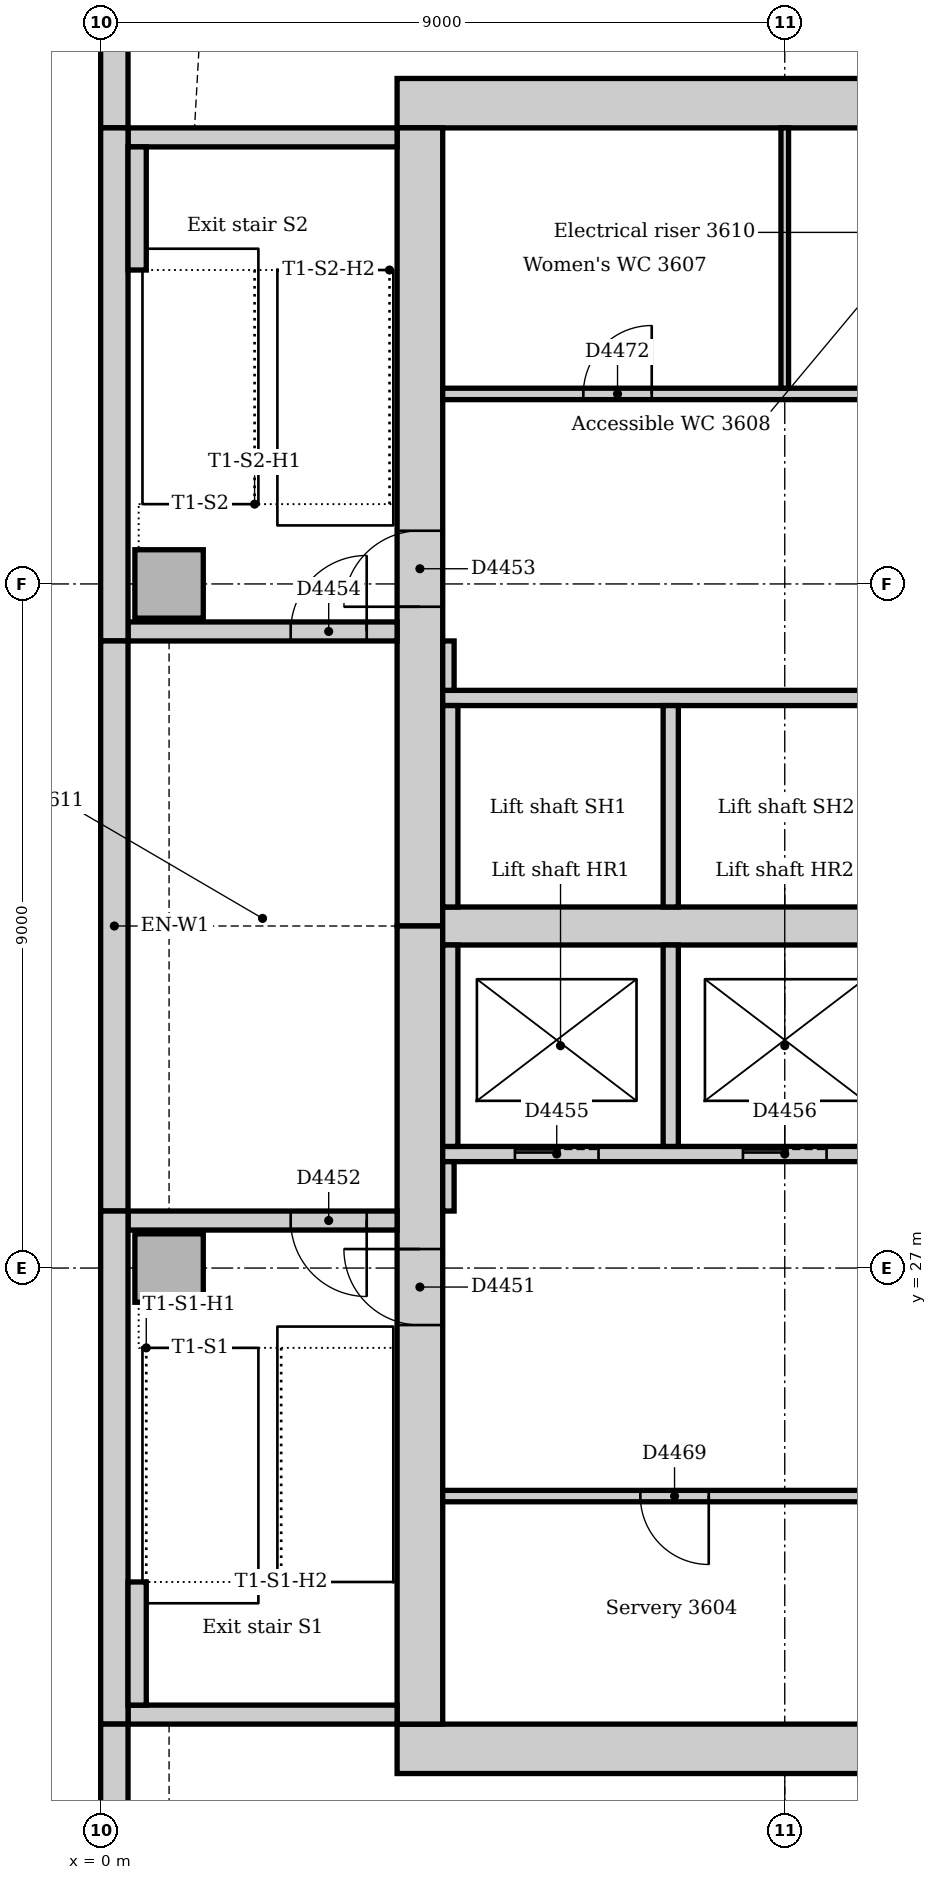
"""IFC4 building model, lengths in metres.
Left out: names, types, materials, properties, quantities, classifications, styles, units other than length and angle.
Written with IfcOpenShell. Run it as: python <this file> out.ifc"""

import sys

from ifc_helpers import new_model, si_unit, direction, frame, frame_2d, origin, origin_2d, place, context, subcontext, project, spatial, rectangle, extrude, element, fill, save


model = new_model("IFC4")
c1 = context("Model", 3, precision=1e-05, world=origin(), true_north=direction((0.0, 1.0)))
c2 = subcontext(c1, "Body", "Model", "MODEL_VIEW")
j1 = project(units=[si_unit("LENGTHUNIT", "METRE"), si_unit("PLANEANGLEUNIT", "RADIAN")], contexts=[c1])
p1 = place(None, origin())
s1 = spatial("IfcSite", under=j1, at=p1, CompositionType="ELEMENT")
p2 = place(p1, origin())
s2 = spatial("IfcBuilding", under=s1, at=p2, CompositionType="ELEMENT")
p3 = place(p2, frame((0.0, 0.0, 153.0)))
s3 = spatial("IfcBuildingStorey", under=s2, at=p3, CompositionType="ELEMENT", Elevation=153.0)
for number, where, z_axis, x_axis in (
    (1, (3.9, 20.675, 0.0), (0.0, 0.0, 1.0), (1.0, 0.0, 0.0)),
    (2, (23.15, 42.325, 0.0), (0.0, 0.0, 1.0), (-1.0, 0.0, 0.0)),
):
    element("IfcWall", number, at=place(p3, frame(where, z_axis=z_axis, x_axis=x_axis)), inside=s3, PredefinedType="SOLIDWALL", context=c2, shape_type="SweptSolid", body=[
        extrude(rectangle(XDim=19.25, YDim=0.65, at=frame_2d((9.625, 0.0))), origin(), (0.0, 0.0, 1.0), 4.0),
    ])
p4 = place(p3, frame((4.2, 42.0, 0.0), z_axis=(0.0, 0.0, 1.0), x_axis=(0.0, -1.0, 0.0)))
e3 = element("IfcWall", 3, at=p4, inside=s3, PredefinedType="SOLIDWALL", context=c2, shape_type="SweptSolid", body=[
    extrude(rectangle(XDim=10.5, YDim=0.6, at=frame_2d((5.25, 0.0))), origin(), (0.0, 0.0, 1.0), 4.0),
])
p5 = place(p4, frame((5.3, 0.0, 0.0)))
e4 = element("IfcOpeningElement", 4, at=p5, cuts=e3, PredefinedType="OPENING", context=c2, shape_type="SweptSolid", body=[
    extrude(rectangle(XDim=1.0, YDim=2.1, at=frame_2d((0.5, 1.05))), frame((0.0, 0.31, 0.0), z_axis=(0.0, -1.0, 0.0), x_axis=(1.0, 0.0, 0.0)), (0.0, 0.0, 1.0), 0.62),
])
p6 = place(p3, frame((4.2, 31.5, 0.0), z_axis=(0.0, 0.0, 1.0), x_axis=(0.0, -1.0, 0.0)))
e5 = element("IfcWall", 5, at=p6, inside=s3, PredefinedType="SOLIDWALL", context=c2, shape_type="SweptSolid", body=[
    extrude(rectangle(XDim=10.5, YDim=0.6, at=frame_2d((5.25, 0.0))), origin(), (0.0, 0.0, 1.0), 4.0),
])
p7 = place(p6, frame((4.25, 0.0, 0.0)))
e6 = element("IfcOpeningElement", 6, at=p7, cuts=e5, PredefinedType="OPENING", context=c2, shape_type="SweptSolid", body=[
    extrude(rectangle(XDim=1.0, YDim=2.1, at=frame_2d((0.5, 1.05))), frame((0.0, 0.31, 0.0), z_axis=(0.0, -1.0, 0.0), x_axis=(1.0, 0.0, 0.0)), (0.0, 0.0, 1.0), 0.62),
])
p8 = place(p3, frame((4.5, 31.5, 0.0), z_axis=(0.0, 0.0, 1.0), x_axis=(1.0, 0.0, 0.0)))
e7 = element("IfcWall", 7, at=p8, inside=s3, PredefinedType="SOLIDWALL", context=c2, shape_type="SweptSolid", body=[
    extrude(rectangle(XDim=18.0, YDim=0.5, at=frame_2d((9.0, 0.0))), origin(), (0.0, 0.0, 1.0), 4.0),
])
p9 = place(p3, frame((0.36, 21.125, 0.0), z_axis=(0.0, 0.0, 1.0), x_axis=(1.0, 0.0, 0.0)))
e8 = element("IfcWall", 8, at=p9, inside=s3, PredefinedType="SOLIDWALL", context=c2, shape_type="SweptSolid", body=[
    extrude(rectangle(XDim=3.54, YDim=0.25, at=frame_2d((1.77, 0.0))), origin(), (0.0, 0.0, 1.0), 4.0),
])
p10 = place(p3, frame((3.9, 27.625, 0.0), z_axis=(0.0, 0.0, 1.0), x_axis=(-1.0, 0.0, 0.0)))
e9 = element("IfcWall", 9, at=p10, inside=s3, PredefinedType="SOLIDWALL", context=c2, shape_type="SweptSolid", body=[
    extrude(rectangle(XDim=3.54, YDim=0.25, at=frame_2d((1.77, 0.0))), origin(), (0.0, 0.0, 1.0), 4.0),
])
p11 = place(p10, frame((0.4, 0.0, 0.0)))
e10 = element("IfcOpeningElement", 10, at=p11, cuts=e9, PredefinedType="OPENING", context=c2, shape_type="SweptSolid", body=[
    extrude(rectangle(XDim=1.0, YDim=2.1, at=frame_2d((0.5, 1.05))), frame((0.0, 0.135, 0.0), z_axis=(0.0, -1.0, 0.0), x_axis=(1.0, 0.0, 0.0)), (0.0, 0.0, 1.0), 0.27),
])
p12 = place(p3, frame((0.36, 35.375, 0.0), z_axis=(0.0, 0.0, 1.0), x_axis=(1.0, 0.0, 0.0)))
e11 = element("IfcWall", 11, at=p12, inside=s3, PredefinedType="SOLIDWALL", context=c2, shape_type="SweptSolid", body=[
    extrude(rectangle(XDim=3.54, YDim=0.25, at=frame_2d((1.77, 0.0))), origin(), (0.0, 0.0, 1.0), 4.0),
])
p13 = place(p12, frame((2.14, 0.0, 0.0)))
e12 = element("IfcOpeningElement", 12, at=p13, cuts=e11, PredefinedType="OPENING", context=c2, shape_type="SweptSolid", body=[
    extrude(rectangle(XDim=1.0, YDim=2.1, at=frame_2d((0.5, 1.05))), frame((0.0, 0.135, 0.0), z_axis=(0.0, -1.0, 0.0), x_axis=(1.0, 0.0, 0.0)), (0.0, 0.0, 1.0), 0.27),
])
p14 = place(p3, frame((3.9, 41.875, 0.0), z_axis=(0.0, 0.0, 1.0), x_axis=(-1.0, 0.0, 0.0)))
e13 = element("IfcWall", 13, at=p14, inside=s3, PredefinedType="SOLIDWALL", context=c2, shape_type="SweptSolid", body=[
    extrude(rectangle(XDim=3.54, YDim=0.25, at=frame_2d((1.77, 0.0))), origin(), (0.0, 0.0, 1.0), 4.0),
])
for number, where, z_axis, x_axis in (
    (14, (0.9, 27.0, 0.0), (0.0, 0.0, 1.0), (1.0, 0.0, 0.0)),
    (15, (0.9, 36.0, 0.0), (0.0, 0.0, 1.0), (1.0, 0.0, 0.0)),
):
    element("IfcColumn", number, at=place(p3, frame(where, z_axis=z_axis, x_axis=x_axis)), inside=s3, PredefinedType="COLUMN", context=c2, shape_type="SweptSolid", body=[
        extrude(rectangle(XDim=0.9, YDim=0.9, at=origin_2d()), origin(), (0.0, 0.0, 1.0), 4.0),
    ])
p15 = place(p3, frame((0.18, 49.757, 0.0), z_axis=(0.0, 0.0, 1.0), x_axis=(0.0, -1.0, 0.0)))
e16 = element("IfcWall", 16, at=p15, inside=s3, PredefinedType="STANDARD", context=c2, shape_type="SweptSolid", body=[
    extrude(rectangle(XDim=7.757, YDim=0.36, at=frame_2d((3.879, 0.0))), origin(), (0.0, 0.0, 1.0), 3.85),
])
p16 = place(p15, frame((3.107, 0.0, 0.9)))
e17 = element("IfcOpeningElement", 17, at=p16, cuts=e16, PredefinedType="OPENING", context=c2, shape_type="SweptSolid", body=[
    extrude(rectangle(XDim=3.3, YDim=1.6, at=frame_2d((1.65, 0.8))), frame((0.0, 0.19, 0.0), z_axis=(0.0, -1.0, 0.0), x_axis=(1.0, 0.0, 0.0)), (0.0, 0.0, 1.0), 0.38),
])
p17 = place(p3, frame((0.18, 42.0, 0.0), z_axis=(0.0, 0.0, 1.0), x_axis=(0.0, -1.0, 0.0)))
e18 = element("IfcWall", 18, at=p17, inside=s3, PredefinedType="STANDARD", context=c2, shape_type="SweptSolid", body=[
    extrude(rectangle(XDim=6.75, YDim=0.36, at=frame_2d((3.375, 0.0))), origin(), (0.0, 0.0, 1.0), 3.85),
])
p18 = place(p3, frame((0.18, 35.25, 0.0), z_axis=(0.0, 0.0, 1.0), x_axis=(0.0, -1.0, 0.0)))
e19 = element("IfcWall", 19, at=p18, inside=s3, PredefinedType="STANDARD", context=c2, shape_type="SweptSolid", body=[
    extrude(rectangle(XDim=7.5, YDim=0.36, at=frame_2d((3.75, 0.0))), origin(), (0.0, 0.0, 1.0), 3.85),
])
p19 = place(p3, frame((0.18, 27.75, 0.0), z_axis=(0.0, 0.0, 1.0), x_axis=(0.0, -1.0, 0.0)))
e20 = element("IfcWall", 20, at=p19, inside=s3, PredefinedType="STANDARD", context=c2, shape_type="SweptSolid", body=[
    extrude(rectangle(XDim=6.75, YDim=0.36, at=frame_2d((3.375, 0.0))), origin(), (0.0, 0.0, 1.0), 3.85),
])
p20 = place(p3, frame((0.18, 21.0, 0.0), z_axis=(0.0, 0.0, 1.0), x_axis=(0.0, -1.0, 0.0)))
e21 = element("IfcWall", 21, at=p20, inside=s3, PredefinedType="STANDARD", context=c2, shape_type="SweptSolid", body=[
    extrude(rectangle(XDim=7.757, YDim=0.36, at=frame_2d((3.879, 0.0))), origin(), (0.0, 0.0, 1.0), 3.85),
])
p21 = place(p20, frame((1.35, 0.0, 0.9)))
e22 = element("IfcOpeningElement", 22, at=p21, cuts=e21, PredefinedType="OPENING", context=c2, shape_type="SweptSolid", body=[
    extrude(rectangle(XDim=3.3, YDim=1.6, at=frame_2d((1.65, 0.8))), frame((0.0, 0.19, 0.0), z_axis=(0.0, -1.0, 0.0), x_axis=(1.0, 0.0, 0.0)), (0.0, 0.0, 1.0), 0.38),
])
for number, where, z_axis, x_axis in (
    (23, (0.48, 21.25, 0.0), (0.0, 0.0, 1.0), (0.0, 1.0, 0.0)),
    (24, (0.48, 40.13, 0.0), (0.0, 0.0, 1.0), (0.0, 1.0, 0.0)),
):
    element("IfcWall", number, at=place(p3, frame(where, z_axis=z_axis, x_axis=x_axis)), inside=s3, PredefinedType="STANDARD", context=c2, shape_type="SweptSolid", body=[
        extrude(rectangle(XDim=1.62, YDim=0.24, at=frame_2d((0.81, 0.0))), origin(), (0.0, 0.0, 1.0), 4.0),
    ])
p22 = place(p3, frame((4.5, 28.5, 0.0), z_axis=(0.0, 0.0, 1.0), x_axis=(1.0, 0.0, 0.0)))
e25 = element("IfcWall", 25, at=p22, inside=s3, PredefinedType="PARTITIONING", context=c2, shape_type="SweptSolid", body=[
    extrude(rectangle(XDim=18.0, YDim=0.2, at=frame_2d((9.0, 0.0))), origin(), (0.0, 0.0, 1.0), 3.85),
])
p23 = place(p22, frame((0.95, 0.0, 0.0)))
e26 = element("IfcOpeningElement", 26, at=p23, cuts=e25, PredefinedType="OPENING", context=c2, shape_type="SweptSolid", body=[
    extrude(rectangle(XDim=1.1, YDim=2.1, at=frame_2d((0.55, 1.05))), frame((0.0, 0.11, 0.0), z_axis=(0.0, -1.0, 0.0), x_axis=(1.0, 0.0, 0.0)), (0.0, 0.0, 1.0), 0.22),
])
p24 = place(p22, frame((3.95, 0.0, 0.0)))
e27 = element("IfcOpeningElement", 27, at=p24, cuts=e25, PredefinedType="OPENING", context=c2, shape_type="SweptSolid", body=[
    extrude(rectangle(XDim=1.1, YDim=2.1, at=frame_2d((0.55, 1.05))), frame((0.0, 0.11, 0.0), z_axis=(0.0, -1.0, 0.0), x_axis=(1.0, 0.0, 0.0)), (0.0, 0.0, 1.0), 0.22),
])
p25 = place(p22, frame((6.95, 0.0, 0.0)))
e28 = element("IfcOpeningElement", 28, at=p25, cuts=e25, PredefinedType="OPENING", context=c2, shape_type="SweptSolid", body=[
    extrude(rectangle(XDim=1.1, YDim=2.1, at=frame_2d((0.55, 1.05))), frame((0.0, 0.11, 0.0), z_axis=(0.0, -1.0, 0.0), x_axis=(1.0, 0.0, 0.0)), (0.0, 0.0, 1.0), 0.22),
])
p26 = place(p22, frame((9.95, 0.0, 0.0)))
e29 = element("IfcOpeningElement", 29, at=p26, cuts=e25, PredefinedType="OPENING", context=c2, shape_type="SweptSolid", body=[
    extrude(rectangle(XDim=1.1, YDim=2.1, at=frame_2d((0.55, 1.05))), frame((0.0, 0.11, 0.0), z_axis=(0.0, -1.0, 0.0), x_axis=(1.0, 0.0, 0.0)), (0.0, 0.0, 1.0), 0.22),
])
p27 = place(p22, frame((12.95, 0.0, 0.0)))
e30 = element("IfcOpeningElement", 30, at=p27, cuts=e25, PredefinedType="OPENING", context=c2, shape_type="SweptSolid", body=[
    extrude(rectangle(XDim=1.1, YDim=2.1, at=frame_2d((0.55, 1.05))), frame((0.0, 0.11, 0.0), z_axis=(0.0, -1.0, 0.0), x_axis=(1.0, 0.0, 0.0)), (0.0, 0.0, 1.0), 0.22),
])
p28 = place(p22, frame((15.95, 0.0, 0.0)))
e31 = element("IfcOpeningElement", 31, at=p28, cuts=e25, PredefinedType="OPENING", context=c2, shape_type="SweptSolid", body=[
    extrude(rectangle(XDim=1.1, YDim=2.1, at=frame_2d((0.55, 1.05))), frame((0.0, 0.11, 0.0), z_axis=(0.0, -1.0, 0.0), x_axis=(1.0, 0.0, 0.0)), (0.0, 0.0, 1.0), 0.22),
])
p29 = place(p3, frame((4.5, 34.5, 0.0), z_axis=(0.0, 0.0, 1.0), x_axis=(1.0, 0.0, 0.0)))
e32 = element("IfcWall", 32, at=p29, inside=s3, PredefinedType="PARTITIONING", context=c2, shape_type="SweptSolid", body=[
    extrude(rectangle(XDim=18.0, YDim=0.2, at=frame_2d((9.0, 0.0))), origin(), (0.0, 0.0, 1.0), 3.85),
])
p30 = place(p29, frame((12.95, 0.0, 0.0)))
e33 = element("IfcOpeningElement", 33, at=p30, cuts=e32, PredefinedType="OPENING", context=c2, shape_type="SweptSolid", body=[
    extrude(rectangle(XDim=1.1, YDim=2.1, at=frame_2d((0.55, 1.05))), frame((0.0, 0.11, 0.0), z_axis=(0.0, -1.0, 0.0), x_axis=(1.0, 0.0, 0.0)), (0.0, 0.0, 1.0), 0.22),
])
p31 = place(p29, frame((15.95, 0.0, 0.0)))
e34 = element("IfcOpeningElement", 34, at=p31, cuts=e32, PredefinedType="OPENING", context=c2, shape_type="SweptSolid", body=[
    extrude(rectangle(XDim=1.1, YDim=2.1, at=frame_2d((0.55, 1.05))), frame((0.0, 0.11, 0.0), z_axis=(0.0, -1.0, 0.0), x_axis=(1.0, 0.0, 0.0)), (0.0, 0.0, 1.0), 0.22),
])
for number, where, z_axis, x_axis in (
    (35, (4.6, 31.75, 0.0), (0.0, 0.0, 1.0), (0.0, 1.0, 0.0)),
    (36, (4.6, 28.6, 0.0), (0.0, 0.0, 1.0), (0.0, 1.0, 0.0)),
    (37, (7.5, 28.6, 0.0), (0.0, 0.0, 1.0), (0.0, 1.0, 0.0)),
    (38, (7.5, 31.75, 0.0), (0.0, 0.0, 1.0), (0.0, 1.0, 0.0)),
):
    element("IfcWall", number, at=place(p3, frame(where, z_axis=z_axis, x_axis=x_axis)), inside=s3, PredefinedType="PARTITIONING", context=c2, shape_type="SweptSolid", body=[
        extrude(rectangle(XDim=2.65, YDim=0.2, at=frame_2d((1.325, 0.0))), origin(), (0.0, 0.0, 1.0), 3.85),
    ])
p32 = place(p3, frame((4.5, 24.0, 0.0), z_axis=(0.0, 0.0, 1.0), x_axis=(1.0, 0.0, 0.0)))
e39 = element("IfcWall", 39, at=p32, inside=s3, PredefinedType="PARTITIONING", context=c2, shape_type="SweptSolid", body=[
    extrude(rectangle(XDim=18.0, YDim=0.15, at=frame_2d((9.0, 0.0))), origin(), (0.0, 0.0, 1.0), 3.85),
])
p33 = place(p32, frame((2.6, 0.0, 0.0)))
e40 = element("IfcOpeningElement", 40, at=p33, cuts=e39, PredefinedType="OPENING", context=c2, shape_type="SweptSolid", body=[
    extrude(rectangle(XDim=0.9, YDim=2.1, at=frame_2d((0.45, 1.05))), frame((0.0, 0.085, 0.0), z_axis=(0.0, -1.0, 0.0), x_axis=(1.0, 0.0, 0.0)), (0.0, 0.0, 1.0), 0.17),
])
p34 = place(p32, frame((8.55, 0.0, 0.0)))
e41 = element("IfcOpeningElement", 41, at=p34, cuts=e39, PredefinedType="OPENING", context=c2, shape_type="SweptSolid", body=[
    extrude(rectangle(XDim=0.9, YDim=2.1, at=frame_2d((0.45, 1.05))), frame((0.0, 0.085, 0.0), z_axis=(0.0, -1.0, 0.0), x_axis=(1.0, 0.0, 0.0)), (0.0, 0.0, 1.0), 0.17),
])
p35 = place(p32, frame((14.45, 0.0, 0.0)))
e42 = element("IfcOpeningElement", 42, at=p35, cuts=e39, PredefinedType="OPENING", context=c2, shape_type="SweptSolid", body=[
    extrude(rectangle(XDim=0.9, YDim=2.1, at=frame_2d((0.45, 1.05))), frame((0.0, 0.085, 0.0), z_axis=(0.0, -1.0, 0.0), x_axis=(1.0, 0.0, 0.0)), (0.0, 0.0, 1.0), 0.17),
])
p36 = place(p3, frame((4.5, 38.5, 0.0), z_axis=(0.0, 0.0, 1.0), x_axis=(1.0, 0.0, 0.0)))
e43 = element("IfcWall", 43, at=p36, inside=s3, PredefinedType="PARTITIONING", context=c2, shape_type="SweptSolid", body=[
    extrude(rectangle(XDim=11.9, YDim=0.15, at=frame_2d((5.95, 0.0))), origin(), (0.0, 0.0, 1.0), 3.85),
])
p37 = place(p36, frame((1.85, 0.0, 0.0)))
e44 = element("IfcOpeningElement", 44, at=p37, cuts=e43, PredefinedType="OPENING", context=c2, shape_type="SweptSolid", body=[
    extrude(rectangle(XDim=0.9, YDim=2.1, at=frame_2d((0.45, 1.05))), frame((0.0, 0.085, 0.0), z_axis=(0.0, -1.0, 0.0), x_axis=(1.0, 0.0, 0.0)), (0.0, 0.0, 1.0), 0.17),
])
p38 = place(p36, frame((5.55, 0.0, 0.0)))
e45 = element("IfcOpeningElement", 45, at=p38, cuts=e43, PredefinedType="OPENING", context=c2, shape_type="SweptSolid", body=[
    extrude(rectangle(XDim=0.9, YDim=2.1, at=frame_2d((0.45, 1.05))), frame((0.0, 0.085, 0.0), z_axis=(0.0, -1.0, 0.0), x_axis=(1.0, 0.0, 0.0)), (0.0, 0.0, 1.0), 0.17),
])
p39 = place(p36, frame((7.8, 0.0, 0.0)))
e46 = element("IfcOpeningElement", 46, at=p39, cuts=e43, PredefinedType="OPENING", context=c2, shape_type="SweptSolid", body=[
    extrude(rectangle(XDim=0.9, YDim=2.1, at=frame_2d((0.45, 1.05))), frame((0.0, 0.085, 0.0), z_axis=(0.0, -1.0, 0.0), x_axis=(1.0, 0.0, 0.0)), (0.0, 0.0, 1.0), 0.17),
])
p40 = place(p36, frame((9.95, 0.0, 0.0)))
e47 = element("IfcOpeningElement", 47, at=p40, cuts=e43, PredefinedType="OPENING", context=c2, shape_type="SweptSolid", body=[
    extrude(rectangle(XDim=0.8, YDim=2.1, at=frame_2d((0.4, 1.05))), frame((0.0, 0.085, 0.0), z_axis=(0.0, -1.0, 0.0), x_axis=(1.0, 0.0, 0.0)), (0.0, 0.0, 1.0), 0.17),
])
for number, where, z_axis, x_axis in (
    (48, (4.575, 27.75, 0.0), (0.0, 0.0, 1.0), (0.0, 1.0, 0.0)),
    (49, (4.575, 34.6, 0.0), (0.0, 0.0, 1.0), (0.0, 1.0, 0.0)),
):
    element("IfcWall", number, at=place(p3, frame(where, z_axis=z_axis, x_axis=x_axis)), inside=s3, PredefinedType="PARTITIONING", context=c2, shape_type="SweptSolid", body=[
        extrude(rectangle(XDim=0.65, YDim=0.15, at=frame_2d((0.325, 0.0))), origin(), (0.0, 0.0, 1.0), 3.85),
    ])
p41 = place(p3, frame((9.0, 38.575, 0.0), z_axis=(0.0, 0.0, 1.0), x_axis=(0.0, 1.0, 0.0)))
e50 = element("IfcWall", 50, at=p41, inside=s3, PredefinedType="PARTITIONING", context=c2, shape_type="SweptSolid", body=[
    extrude(rectangle(XDim=3.425, YDim=0.1, at=frame_2d((1.712, 0.0))), origin(), (0.0, 0.0, 1.0), 3.85),
])
p42 = place(p7, frame((1.0, 0.0, 0.0), z_axis=(0.0, 0.0, 1.0), x_axis=(-1.0, 0.0, 0.0)))
e51 = element("IfcDoor", 51, at=p42, inside=s3, OperationType="SINGLE_SWING_RIGHT", PredefinedType="DOOR", context=c2, shape_type="SweptSolid", body=[
    extrude(rectangle(XDim=1.0, YDim=2.1, at=frame_2d((0.5, 1.05))), frame((0.0, 0.025, 0.0), z_axis=(0.0, -1.0, 0.0), x_axis=(1.0, 0.0, 0.0)), (0.0, 0.0, 1.0), 0.05),
])
fill(e6, e51)
p43 = place(p11, origin())
e52 = element("IfcDoor", 52, at=p43, inside=s3, OperationType="SINGLE_SWING_LEFT", PredefinedType="DOOR", context=c2, shape_type="SweptSolid", body=[
    extrude(rectangle(XDim=1.0, YDim=2.1, at=frame_2d((0.5, 1.05))), frame((0.0, 0.025, 0.0), z_axis=(0.0, -1.0, 0.0), x_axis=(1.0, 0.0, 0.0)), (0.0, 0.0, 1.0), 0.05),
])
fill(e10, e52)
p44 = place(p5, frame((1.0, 0.0, 0.0), z_axis=(0.0, 0.0, 1.0), x_axis=(-1.0, 0.0, 0.0)))
e53 = element("IfcDoor", 53, at=p44, inside=s3, OperationType="SINGLE_SWING_LEFT", PredefinedType="DOOR", context=c2, shape_type="SweptSolid", body=[
    extrude(rectangle(XDim=1.0, YDim=2.1, at=frame_2d((0.5, 1.05))), frame((0.0, 0.025, 0.0), z_axis=(0.0, -1.0, 0.0), x_axis=(1.0, 0.0, 0.0)), (0.0, 0.0, 1.0), 0.05),
])
fill(e4, e53)
p45 = place(p13, origin())
e54 = element("IfcDoor", 54, at=p45, inside=s3, OperationType="SINGLE_SWING_RIGHT", PredefinedType="DOOR", context=c2, shape_type="SweptSolid", body=[
    extrude(rectangle(XDim=1.0, YDim=2.1, at=frame_2d((0.5, 1.05))), frame((0.0, 0.025, 0.0), z_axis=(0.0, -1.0, 0.0), x_axis=(1.0, 0.0, 0.0)), (0.0, 0.0, 1.0), 0.05),
])
fill(e12, e54)
p46 = place(p23, origin())
e55 = element("IfcDoor", 55, at=p46, inside=s3, OperationType="SLIDING_TO_LEFT", PredefinedType="DOOR", context=c2, shape_type="SweptSolid", body=[
    extrude(rectangle(XDim=1.1, YDim=2.1, at=frame_2d((0.55, 1.05))), frame((0.0, 0.025, 0.0), z_axis=(0.0, -1.0, 0.0), x_axis=(1.0, 0.0, 0.0)), (0.0, 0.0, 1.0), 0.05),
])
fill(e26, e55)
p47 = place(p24, origin())
e56 = element("IfcDoor", 56, at=p47, inside=s3, OperationType="SLIDING_TO_LEFT", PredefinedType="DOOR", context=c2, shape_type="SweptSolid", body=[
    extrude(rectangle(XDim=1.1, YDim=2.1, at=frame_2d((0.55, 1.05))), frame((0.0, 0.025, 0.0), z_axis=(0.0, -1.0, 0.0), x_axis=(1.0, 0.0, 0.0)), (0.0, 0.0, 1.0), 0.05),
])
fill(e27, e56)
p48 = place(p33, frame((0.9, 0.0, 0.0), z_axis=(0.0, 0.0, 1.0), x_axis=(-1.0, 0.0, 0.0)))
e57 = element("IfcDoor", 57, at=p48, inside=s3, OperationType="SINGLE_SWING_LEFT", PredefinedType="DOOR", context=c2, shape_type="SweptSolid", body=[
    extrude(rectangle(XDim=0.9, YDim=2.1, at=frame_2d((0.45, 1.05))), frame((0.0, 0.025, 0.0), z_axis=(0.0, -1.0, 0.0), x_axis=(1.0, 0.0, 0.0)), (0.0, 0.0, 1.0), 0.05),
])
fill(e40, e57)
p49 = place(p37, origin())
e58 = element("IfcDoor", 58, at=p49, inside=s3, OperationType="SINGLE_SWING_RIGHT", PredefinedType="DOOR", context=c2, shape_type="SweptSolid", body=[
    extrude(rectangle(XDim=0.9, YDim=2.1, at=frame_2d((0.45, 1.05))), frame((0.0, 0.025, 0.0), z_axis=(0.0, -1.0, 0.0), x_axis=(1.0, 0.0, 0.0)), (0.0, 0.0, 1.0), 0.05),
])
fill(e44, e58)
save(model, sys.argv[1])
